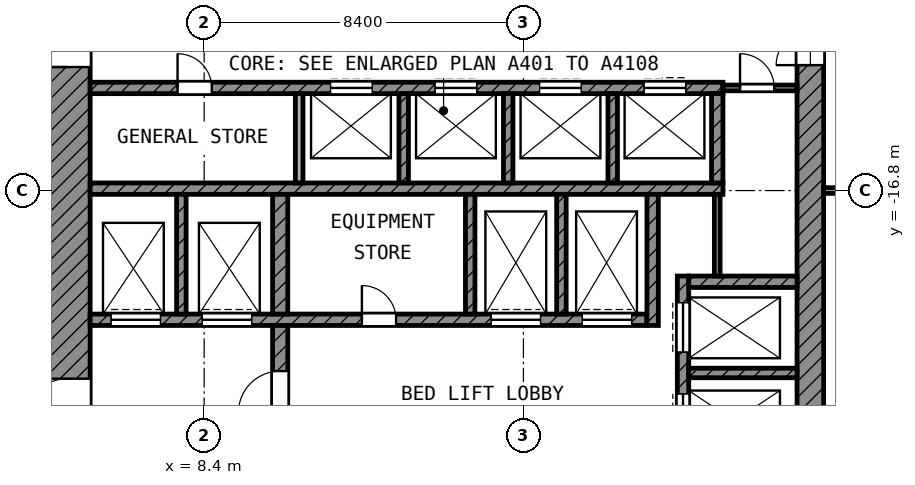
"""IFC4 building model, lengths in metres.
Left out: names, types, materials, properties, quantities, classifications, styles, units other than length and angle.
Written with IfcOpenShell. Run it as: python <this file> out.ifc"""

import sys

from ifc_helpers import new_model, si_unit, direction, frame, frame_2d, origin, place, context, subcontext, project, spatial, rectangle, extrude, element, fill, save


model = new_model("IFC4")
c1 = context("Model", 3, precision=1e-05, world=origin(), true_north=direction((0.0, 1.0)))
c2 = subcontext(c1, "Body", "Model", "MODEL_VIEW")
j1 = project(units=[si_unit("LENGTHUNIT", "METRE"), si_unit("PLANEANGLEUNIT", "RADIAN")], contexts=[c1])
p1 = place(None, origin())
s1 = spatial("IfcSite", under=j1, at=p1, CompositionType="ELEMENT")
p2 = place(p1, origin())
s2 = spatial("IfcBuilding", under=s1, at=p2, CompositionType="ELEMENT")
p3 = place(p2, frame((0.0, 0.0, 315.4)))
s3 = spatial("IfcBuildingStorey", under=s2, at=p3, CompositionType="ELEMENT", Elevation=315.4)
p4 = place(p3, frame((4.8, -24.7, 0.0), z_axis=(0.0, 0.0, 1.0), x_axis=(0.0, 1.0, 0.0)))
e1 = element("IfcWall", 1, at=p4, inside=s3, PredefinedType="SHEAR", context=c2, shape_type="SweptSolid", body=[
    extrude(rectangle(XDim=19.3, YDim=1.2, at=frame_2d((9.65, 0.0))), origin(), (0.0, 0.0, 1.0), 3.6),
])
p5 = place(p4, frame((11.15, 0.0, 0.0)))
e2 = element("IfcOpeningElement", 2, at=p5, cuts=e1, PredefinedType="OPENING", context=c2, shape_type="SweptSolid", body=[
    extrude(rectangle(XDim=1.1, YDim=2.1, at=frame_2d((0.55, 1.05))), frame((0.0, 0.61, 0.0), z_axis=(0.0, -1.0, 0.0), x_axis=(1.0, 0.0, 0.0)), (0.0, 0.0, 1.0), 1.22),
])
p6 = place(p4, frame((1.85, 0.0, 0.0)))
e3 = element("IfcOpeningElement", 3, at=p6, cuts=e1, PredefinedType="OPENING", context=c2, shape_type="SweptSolid", body=[
    extrude(rectangle(XDim=1.1, YDim=2.1, at=frame_2d((0.55, 1.05))), frame((0.0, 0.61, 0.0), z_axis=(0.0, -1.0, 0.0), x_axis=(1.0, 0.0, 0.0)), (0.0, 0.0, 1.0), 1.22),
])
p7 = place(p3, frame((24.35, -24.0, 0.0), z_axis=(0.0, 0.0, 1.0), x_axis=(0.0, 1.0, 0.0)))
e4 = element("IfcWall", 4, at=p7, inside=s3, PredefinedType="SHEAR", context=c2, shape_type="SweptSolid", body=[
    extrude(rectangle(XDim=18.6, YDim=0.7, at=frame_2d((9.3, 0.0))), origin(), (0.0, 0.0, 1.0), 3.6),
])
p8 = place(p7, frame((10.5, 0.0, 0.0)))
e5 = element("IfcOpeningElement", 5, at=p8, cuts=e4, PredefinedType="OPENING", context=c2, shape_type="SweptSolid", body=[
    extrude(rectangle(XDim=1.8, YDim=2.1, at=frame_2d((0.9, 1.05))), frame((0.0, 0.36, 0.0), z_axis=(0.0, -1.0, 0.0), x_axis=(1.0, 0.0, 0.0)), (0.0, 0.0, 1.0), 0.72),
])
p9 = place(p3, frame((5.4, -14.1, 0.0), z_axis=(0.0, 0.0, 1.0), x_axis=(1.0, 0.0, 0.0)))
e6 = element("IfcWall", 6, at=p9, inside=s3, PredefinedType="SHEAR", context=c2, shape_type="SweptSolid", body=[
    extrude(rectangle(XDim=16.65, YDim=0.3, at=frame_2d((8.325, 0.0))), origin(), (0.0, 0.0, 1.0), 3.6),
])
p10 = place(p9, frame((6.325, 0.0, 0.0)))
e7 = element("IfcOpeningElement", 7, at=p10, cuts=e6, PredefinedType="OPENING", context=c2, shape_type="SweptSolid", body=[
    extrude(rectangle(XDim=1.1, YDim=2.1, at=frame_2d((0.55, 1.05))), frame((0.0, 0.16, 0.0), z_axis=(0.0, -1.0, 0.0), x_axis=(1.0, 0.0, 0.0)), (0.0, 0.0, 1.0), 0.32),
])
p11 = place(p9, frame((9.075, 0.0, 0.0)))
e8 = element("IfcOpeningElement", 8, at=p11, cuts=e6, PredefinedType="OPENING", context=c2, shape_type="SweptSolid", body=[
    extrude(rectangle(XDim=1.1, YDim=2.1, at=frame_2d((0.55, 1.05))), frame((0.0, 0.16, 0.0), z_axis=(0.0, -1.0, 0.0), x_axis=(1.0, 0.0, 0.0)), (0.0, 0.0, 1.0), 0.32),
])
p12 = place(p9, frame((11.825, 0.0, 0.0)))
e9 = element("IfcOpeningElement", 9, at=p12, cuts=e6, PredefinedType="OPENING", context=c2, shape_type="SweptSolid", body=[
    extrude(rectangle(XDim=1.1, YDim=2.1, at=frame_2d((0.55, 1.05))), frame((0.0, 0.16, 0.0), z_axis=(0.0, -1.0, 0.0), x_axis=(1.0, 0.0, 0.0)), (0.0, 0.0, 1.0), 0.32),
])
p13 = place(p9, frame((14.575, 0.0, 0.0)))
e10 = element("IfcOpeningElement", 10, at=p13, cuts=e6, PredefinedType="OPENING", context=c2, shape_type="SweptSolid", body=[
    extrude(rectangle(XDim=1.1, YDim=2.1, at=frame_2d((0.55, 1.05))), frame((0.0, 0.16, 0.0), z_axis=(0.0, -1.0, 0.0), x_axis=(1.0, 0.0, 0.0)), (0.0, 0.0, 1.0), 0.32),
])
p14 = place(p9, frame((2.3, 0.0, 0.0)))
e11 = element("IfcOpeningElement", 11, at=p14, cuts=e6, PredefinedType="OPENING", context=c2, shape_type="SweptSolid", body=[
    extrude(rectangle(XDim=0.9, YDim=2.1, at=frame_2d((0.45, 1.05))), frame((0.0, 0.16, 0.0), z_axis=(0.0, -1.0, 0.0), x_axis=(1.0, 0.0, 0.0)), (0.0, 0.0, 1.0), 0.32),
])
p15 = place(p3, frame((5.4, -16.75, 0.0), z_axis=(0.0, 0.0, 1.0), x_axis=(1.0, 0.0, 0.0)))
e12 = element("IfcWall", 12, at=p15, inside=s3, PredefinedType="SHEAR", context=c2, shape_type="SweptSolid", body=[
    extrude(rectangle(XDim=16.65, YDim=0.3, at=frame_2d((8.325, 0.0))), origin(), (0.0, 0.0, 1.0), 3.6),
])
p16 = place(p3, frame((5.4, -20.2, 0.0), z_axis=(0.0, 0.0, 1.0), x_axis=(1.0, 0.0, 0.0)))
e13 = element("IfcWall", 13, at=p16, inside=s3, PredefinedType="SHEAR", context=c2, shape_type="SweptSolid", body=[
    extrude(rectangle(XDim=14.65, YDim=0.3, at=frame_2d((7.325, 0.0))), origin(), (0.0, 0.0, 1.0), 3.6),
])
p17 = place(p16, frame((10.55, 0.0, 0.0)))
e14 = element("IfcOpeningElement", 14, at=p17, cuts=e13, PredefinedType="OPENING", context=c2, shape_type="SweptSolid", body=[
    extrude(rectangle(XDim=1.3, YDim=2.1, at=frame_2d((0.65, 1.05))), frame((0.0, 0.16, 0.0), z_axis=(0.0, -1.0, 0.0), x_axis=(1.0, 0.0, 0.0)), (0.0, 0.0, 1.0), 0.32),
])
p18 = place(p16, frame((12.95, 0.0, 0.0)))
e15 = element("IfcOpeningElement", 15, at=p18, cuts=e13, PredefinedType="OPENING", context=c2, shape_type="SweptSolid", body=[
    extrude(rectangle(XDim=1.3, YDim=2.1, at=frame_2d((0.65, 1.05))), frame((0.0, 0.16, 0.0), z_axis=(0.0, -1.0, 0.0), x_axis=(1.0, 0.0, 0.0)), (0.0, 0.0, 1.0), 0.32),
])
p19 = place(p16, frame((0.55, 0.0, 0.0)))
e16 = element("IfcOpeningElement", 16, at=p19, cuts=e13, PredefinedType="OPENING", context=c2, shape_type="SweptSolid", body=[
    extrude(rectangle(XDim=1.3, YDim=2.1, at=frame_2d((0.65, 1.05))), frame((0.0, 0.16, 0.0), z_axis=(0.0, -1.0, 0.0), x_axis=(1.0, 0.0, 0.0)), (0.0, 0.0, 1.0), 0.32),
])
p20 = place(p16, frame((2.95, 0.0, 0.0)))
e17 = element("IfcOpeningElement", 17, at=p20, cuts=e13, PredefinedType="OPENING", context=c2, shape_type="SweptSolid", body=[
    extrude(rectangle(XDim=1.3, YDim=2.1, at=frame_2d((0.65, 1.05))), frame((0.0, 0.16, 0.0), z_axis=(0.0, -1.0, 0.0), x_axis=(1.0, 0.0, 0.0)), (0.0, 0.0, 1.0), 0.32),
])
p21 = place(p16, frame((7.15, 0.0, 0.0)))
e18 = element("IfcOpeningElement", 18, at=p21, cuts=e13, PredefinedType="OPENING", context=c2, shape_type="SweptSolid", body=[
    extrude(rectangle(XDim=0.9, YDim=2.1, at=frame_2d((0.45, 1.05))), frame((0.0, 0.16, 0.0), z_axis=(0.0, -1.0, 0.0), x_axis=(1.0, 0.0, 0.0)), (0.0, 0.0, 1.0), 0.32),
])
p22 = place(p3, frame((10.4, -24.0, 0.0), z_axis=(0.0, 0.0, 1.0), x_axis=(0.0, 1.0, 0.0)))
e19 = element("IfcWall", 19, at=p22, inside=s3, PredefinedType="SHEAR", context=c2, shape_type="SweptSolid", body=[
    extrude(rectangle(XDim=3.65, YDim=0.4, at=frame_2d((1.825, 0.0))), origin(), (0.0, 0.0, 1.0), 3.6),
])
p23 = place(p22, frame((1.35, 0.0, 0.0)))
e20 = element("IfcOpeningElement", 20, at=p23, cuts=e19, PredefinedType="OPENING", context=c2, shape_type="SweptSolid", body=[
    extrude(rectangle(XDim=1.1, YDim=2.1, at=frame_2d((0.55, 1.05))), frame((0.0, 0.21, 0.0), z_axis=(0.0, -1.0, 0.0), x_axis=(1.0, 0.0, 0.0)), (0.0, 0.0, 1.0), 0.42),
])
p24 = place(p3, frame((10.4, -20.05, 0.0), z_axis=(0.0, 0.0, 1.0), x_axis=(0.0, 1.0, 0.0)))
e21 = element("IfcWall", 21, at=p24, inside=s3, PredefinedType="SHEAR", context=c2, shape_type="SweptSolid", body=[
    extrude(rectangle(XDim=3.15, YDim=0.4, at=frame_2d((1.575, 0.0))), origin(), (0.0, 0.0, 1.0), 3.6),
])
p25 = place(p3, frame((20.2, -20.35, 0.0), z_axis=(0.0, 0.0, 1.0), x_axis=(0.0, 1.0, 0.0)))
e22 = element("IfcWall", 22, at=p25, inside=s3, PredefinedType="SHEAR", context=c2, shape_type="SweptSolid", body=[
    extrude(rectangle(XDim=3.45, YDim=0.3, at=frame_2d((1.725, 0.0))), origin(), (0.0, 0.0, 1.0), 3.6),
])
p26 = place(p3, frame((21.9, -16.6, 0.0), z_axis=(0.0, 0.0, 1.0), x_axis=(0.0, 1.0, 0.0)))
e23 = element("IfcWall", 23, at=p26, inside=s3, PredefinedType="SHEAR", context=c2, shape_type="SweptSolid", body=[
    extrude(rectangle(XDim=2.35, YDim=0.3, at=frame_2d((1.175, 0.0))), origin(), (0.0, 0.0, 1.0), 3.6),
])
p27 = place(p3, frame((21.15, -19.2, 0.0), z_axis=(0.0, 0.0, 1.0), x_axis=(1.0, 0.0, 0.0)))
e24 = element("IfcWall", 24, at=p27, inside=s3, PredefinedType="SHEAR", context=c2, shape_type="SweptSolid", body=[
    extrude(rectangle(XDim=2.85, YDim=0.3, at=frame_2d((1.425, 0.0))), origin(), (0.0, 0.0, 1.0), 3.6),
])
p28 = place(p3, frame((21.0, -24.0, 0.0), z_axis=(0.0, 0.0, 1.0), x_axis=(0.0, 1.0, 0.0)))
e25 = element("IfcWall", 25, at=p28, inside=s3, PredefinedType="SHEAR", context=c2, shape_type="SweptSolid", body=[
    extrude(rectangle(XDim=4.95, YDim=0.3, at=frame_2d((2.475, 0.0))), origin(), (0.0, 0.0, 1.0), 3.6),
])
p29 = place(p28, frame((2.95, 0.0, 0.0)))
e26 = element("IfcOpeningElement", 26, at=p29, cuts=e25, PredefinedType="OPENING", context=c2, shape_type="SweptSolid", body=[
    extrude(rectangle(XDim=1.3, YDim=2.1, at=frame_2d((0.65, 1.05))), frame((0.0, 0.16, 0.0), z_axis=(0.0, -1.0, 0.0), x_axis=(1.0, 0.0, 0.0)), (0.0, 0.0, 1.0), 0.32),
])
p30 = place(p28, frame((0.55, 0.0, 0.0)))
e27 = element("IfcOpeningElement", 27, at=p30, cuts=e25, PredefinedType="OPENING", context=c2, shape_type="SweptSolid", body=[
    extrude(rectangle(XDim=1.3, YDim=2.1, at=frame_2d((0.65, 1.05))), frame((0.0, 0.16, 0.0), z_axis=(0.0, -1.0, 0.0), x_axis=(1.0, 0.0, 0.0)), (0.0, 0.0, 1.0), 0.32),
])
p31 = place(p3, frame((21.15, -21.6, 0.0), z_axis=(0.0, 0.0, 1.0), x_axis=(1.0, 0.0, 0.0)))
e28 = element("IfcWall", 28, at=p31, inside=s3, PredefinedType="SHEAR", context=c2, shape_type="SweptSolid", body=[
    extrude(rectangle(XDim=2.85, YDim=0.25, at=frame_2d((1.425, 0.0))), origin(), (0.0, 0.0, 1.0), 3.6),
])
for number, where, z_axis, x_axis in (
    (29, (7.8, -20.05, 0.0), (0.0, 0.0, 1.0), (0.0, 1.0, 0.0)),
    (30, (15.4, -20.05, 0.0), (0.0, 0.0, 1.0), (0.0, 1.0, 0.0)),
    (31, (17.8, -20.05, 0.0), (0.0, 0.0, 1.0), (0.0, 1.0, 0.0)),
):
    element("IfcWall", number, at=place(p3, frame(where, z_axis=z_axis, x_axis=x_axis)), inside=s3, PredefinedType="SHEAR", context=c2, shape_type="SweptSolid", body=[
        extrude(rectangle(XDim=3.15, YDim=0.25, at=frame_2d((1.575, 0.0))), origin(), (0.0, 0.0, 1.0), 3.6),
    ])
p32 = place(p3, frame((10.9, -16.6, 0.0), z_axis=(0.0, 0.0, 1.0), x_axis=(0.0, 1.0, 0.0)))
e32 = element("IfcWall", 32, at=p32, inside=s3, PredefinedType="PARTITIONING", context=c2, shape_type="SweptSolid", body=[
    extrude(rectangle(XDim=2.35, YDim=0.2, at=frame_2d((1.175, 0.0))), origin(), (0.0, 0.0, 1.0), 3.6),
])
for number, where, z_axis, x_axis in (
    (33, (13.65, -16.6, 0.0), (0.0, 0.0, 1.0), (0.0, 1.0, 0.0)),
    (34, (16.4, -16.6, 0.0), (0.0, 0.0, 1.0), (0.0, 1.0, 0.0)),
    (35, (19.15, -16.6, 0.0), (0.0, 0.0, 1.0), (0.0, 1.0, 0.0)),
):
    element("IfcWall", number, at=place(p3, frame(where, z_axis=z_axis, x_axis=x_axis)), inside=s3, PredefinedType="SHEAR", context=c2, shape_type="SweptSolid", body=[
        extrude(rectangle(XDim=2.35, YDim=0.25, at=frame_2d((1.175, 0.0))), origin(), (0.0, 0.0, 1.0), 3.6),
    ])
p33 = place(p3, frame((21.9, -19.05, 0.0), z_axis=(0.0, 0.0, 1.0), x_axis=(0.0, 1.0, 0.0)))
e36 = element("IfcWall", 36, at=p33, inside=s3, PredefinedType="PARTITIONING", context=c2, shape_type="SweptSolid", body=[
    extrude(rectangle(XDim=2.15, YDim=0.15, at=frame_2d((1.075, 0.0))), origin(), (0.0, 0.0, 1.0), 3.6),
])
p34 = place(p3, frame((22.05, -14.1, 0.0), z_axis=(0.0, 0.0, 1.0), x_axis=(1.0, 0.0, 0.0)))
e37 = element("IfcWall", 37, at=p34, inside=s3, PredefinedType="PARTITIONING", context=c2, shape_type="SweptSolid", body=[
    extrude(rectangle(XDim=1.95, YDim=0.15, at=frame_2d((0.975, 0.0))), origin(), (0.0, 0.0, 1.0), 3.6),
])
p35 = place(p34, frame((0.45, 0.0, 0.0)))
e38 = element("IfcOpeningElement", 38, at=p35, cuts=e37, PredefinedType="OPENING", context=c2, shape_type="SweptSolid", body=[
    extrude(rectangle(XDim=0.9, YDim=2.1, at=frame_2d((0.45, 1.05))), frame((0.0, 0.085, 0.0), z_axis=(0.0, -1.0, 0.0), x_axis=(1.0, 0.0, 0.0)), (0.0, 0.0, 1.0), 0.17),
])
p36 = place(p3, frame((24.7, -16.8, 0.0), z_axis=(0.0, 0.0, 1.0), x_axis=(1.0, 0.0, 0.0)))
e39 = element("IfcWall", 39, at=p36, inside=s3, PredefinedType="PARTITIONING", context=c2, shape_type="SweptSolid", body=[
    extrude(rectangle(XDim=34.02, YDim=0.15, at=frame_2d((17.01, 0.0))), origin(), (0.0, 0.0, 1.0), 3.6),
])
p37 = place(p36, frame((1.85, 0.0, 0.0)))
e40 = element("IfcOpeningElement", 40, at=p37, cuts=e39, PredefinedType="OPENING", context=c2, shape_type="SweptSolid", body=[
    extrude(rectangle(XDim=1.5, YDim=2.1, at=frame_2d((0.75, 1.05))), frame((0.0, 0.085, 0.0), z_axis=(0.0, -1.0, 0.0), x_axis=(1.0, 0.0, 0.0)), (0.0, 0.0, 1.0), 0.17),
])
p38 = place(p36, frame((9.4, 0.0, 0.0)))
e41 = element("IfcOpeningElement", 41, at=p38, cuts=e39, PredefinedType="OPENING", context=c2, shape_type="SweptSolid", body=[
    extrude(rectangle(XDim=1.2, YDim=2.1, at=frame_2d((0.6, 1.05))), frame((0.0, 0.085, 0.0), z_axis=(0.0, -1.0, 0.0), x_axis=(1.0, 0.0, 0.0)), (0.0, 0.0, 1.0), 0.17),
])
p39 = place(p36, frame((19.8, 0.0, 0.0)))
e42 = element("IfcOpeningElement", 42, at=p39, cuts=e39, PredefinedType="OPENING", context=c2, shape_type="SweptSolid", body=[
    extrude(rectangle(XDim=1.2, YDim=2.1, at=frame_2d((0.6, 1.05))), frame((0.0, 0.085, 0.0), z_axis=(0.0, -1.0, 0.0), x_axis=(1.0, 0.0, 0.0)), (0.0, 0.0, 1.0), 0.17),
])
p40 = place(p36, frame((18.28, 0.0, 0.0)))
e43 = element("IfcOpeningElement", 43, at=p40, cuts=e39, PredefinedType="OPENING", context=c2, shape_type="SweptSolid", body=[
    extrude(rectangle(XDim=1.2, YDim=2.1, at=frame_2d((0.6, 1.05))), frame((0.0, 0.085, 0.0), z_axis=(0.0, -1.0, 0.0), x_axis=(1.0, 0.0, 0.0)), (0.0, 0.0, 1.0), 0.17),
])
p41 = place(p36, frame((24.0, 0.0, 0.0)))
e44 = element("IfcOpeningElement", 44, at=p41, cuts=e39, PredefinedType="OPENING", context=c2, shape_type="SweptSolid", body=[
    extrude(rectangle(XDim=1.2, YDim=2.1, at=frame_2d((0.6, 1.05))), frame((0.0, 0.085, 0.0), z_axis=(0.0, -1.0, 0.0), x_axis=(1.0, 0.0, 0.0)), (0.0, 0.0, 1.0), 0.17),
])
p42 = place(p36, frame((27.45, 0.0, 0.0)))
e45 = element("IfcOpeningElement", 45, at=p42, cuts=e39, PredefinedType="OPENING", context=c2, shape_type="SweptSolid", body=[
    extrude(rectangle(XDim=1.0, YDim=2.1, at=frame_2d((0.5, 1.05))), frame((0.0, 0.085, 0.0), z_axis=(0.0, -1.0, 0.0), x_axis=(1.0, 0.0, 0.0)), (0.0, 0.0, 1.0), 0.17),
])
p43 = place(p36, frame((31.65, 0.0, 0.0)))
e46 = element("IfcOpeningElement", 46, at=p43, cuts=e39, PredefinedType="OPENING", context=c2, shape_type="SweptSolid", body=[
    extrude(rectangle(XDim=1.0, YDim=2.1, at=frame_2d((0.5, 1.05))), frame((0.0, 0.085, 0.0), z_axis=(0.0, -1.0, 0.0), x_axis=(1.0, 0.0, 0.0)), (0.0, 0.0, 1.0), 0.17),
])
p44 = place(p10, origin())
e47 = element("IfcDoor", 47, at=p44, inside=s3, OperationType="DOUBLE_DOOR_SLIDING", PredefinedType="DOOR", context=c2, shape_type="SweptSolid", body=[
    extrude(rectangle(XDim=1.1, YDim=2.1, at=frame_2d((0.55, 1.05))), frame((0.0, 0.025, 0.0), z_axis=(0.0, -1.0, 0.0), x_axis=(1.0, 0.0, 0.0)), (0.0, 0.0, 1.0), 0.05),
])
fill(e7, e47)
p45 = place(p11, origin())
e48 = element("IfcDoor", 48, at=p45, inside=s3, OperationType="DOUBLE_DOOR_SLIDING", PredefinedType="DOOR", context=c2, shape_type="SweptSolid", body=[
    extrude(rectangle(XDim=1.1, YDim=2.1, at=frame_2d((0.55, 1.05))), frame((0.0, 0.025, 0.0), z_axis=(0.0, -1.0, 0.0), x_axis=(1.0, 0.0, 0.0)), (0.0, 0.0, 1.0), 0.05),
])
fill(e8, e48)
p46 = place(p12, origin())
e49 = element("IfcDoor", 49, at=p46, inside=s3, OperationType="DOUBLE_DOOR_SLIDING", PredefinedType="DOOR", context=c2, shape_type="SweptSolid", body=[
    extrude(rectangle(XDim=1.1, YDim=2.1, at=frame_2d((0.55, 1.05))), frame((0.0, 0.025, 0.0), z_axis=(0.0, -1.0, 0.0), x_axis=(1.0, 0.0, 0.0)), (0.0, 0.0, 1.0), 0.05),
])
fill(e9, e49)
p47 = place(p13, origin())
e50 = element("IfcDoor", 50, at=p47, inside=s3, OperationType="DOUBLE_DOOR_SLIDING", PredefinedType="DOOR", context=c2, shape_type="SweptSolid", body=[
    extrude(rectangle(XDim=1.1, YDim=2.1, at=frame_2d((0.55, 1.05))), frame((0.0, 0.025, 0.0), z_axis=(0.0, -1.0, 0.0), x_axis=(1.0, 0.0, 0.0)), (0.0, 0.0, 1.0), 0.05),
])
fill(e10, e50)
p48 = place(p29, origin())
e51 = element("IfcDoor", 51, at=p48, inside=s3, OperationType="DOUBLE_DOOR_SLIDING", PredefinedType="DOOR", context=c2, shape_type="SweptSolid", body=[
    extrude(rectangle(XDim=1.3, YDim=2.1, at=frame_2d((0.65, 1.05))), frame((0.0, 0.025, 0.0), z_axis=(0.0, -1.0, 0.0), x_axis=(1.0, 0.0, 0.0)), (0.0, 0.0, 1.0), 0.05),
])
fill(e26, e51)
p49 = place(p30, origin())
e52 = element("IfcDoor", 52, at=p49, inside=s3, OperationType="DOUBLE_DOOR_SLIDING", PredefinedType="DOOR", context=c2, shape_type="SweptSolid", body=[
    extrude(rectangle(XDim=1.3, YDim=2.1, at=frame_2d((0.65, 1.05))), frame((0.0, 0.025, 0.0), z_axis=(0.0, -1.0, 0.0), x_axis=(1.0, 0.0, 0.0)), (0.0, 0.0, 1.0), 0.05),
])
fill(e27, e52)
p50 = place(p17, origin())
e53 = element("IfcDoor", 53, at=p50, inside=s3, OperationType="DOUBLE_DOOR_SLIDING", PredefinedType="DOOR", context=c2, shape_type="SweptSolid", body=[
    extrude(rectangle(XDim=1.3, YDim=2.1, at=frame_2d((0.65, 1.05))), frame((0.0, 0.025, 0.0), z_axis=(0.0, -1.0, 0.0), x_axis=(1.0, 0.0, 0.0)), (0.0, 0.0, 1.0), 0.05),
])
fill(e14, e53)
p51 = place(p18, origin())
e54 = element("IfcDoor", 54, at=p51, inside=s3, OperationType="DOUBLE_DOOR_SLIDING", PredefinedType="DOOR", context=c2, shape_type="SweptSolid", body=[
    extrude(rectangle(XDim=1.3, YDim=2.1, at=frame_2d((0.65, 1.05))), frame((0.0, 0.025, 0.0), z_axis=(0.0, -1.0, 0.0), x_axis=(1.0, 0.0, 0.0)), (0.0, 0.0, 1.0), 0.05),
])
fill(e15, e54)
p52 = place(p19, origin())
e55 = element("IfcDoor", 55, at=p52, inside=s3, OperationType="DOUBLE_DOOR_SLIDING", PredefinedType="DOOR", context=c2, shape_type="SweptSolid", body=[
    extrude(rectangle(XDim=1.3, YDim=2.1, at=frame_2d((0.65, 1.05))), frame((0.0, 0.025, 0.0), z_axis=(0.0, -1.0, 0.0), x_axis=(1.0, 0.0, 0.0)), (0.0, 0.0, 1.0), 0.05),
])
fill(e16, e55)
p53 = place(p20, origin())
e56 = element("IfcDoor", 56, at=p53, inside=s3, OperationType="DOUBLE_DOOR_SLIDING", PredefinedType="DOOR", context=c2, shape_type="SweptSolid", body=[
    extrude(rectangle(XDim=1.3, YDim=2.1, at=frame_2d((0.65, 1.05))), frame((0.0, 0.025, 0.0), z_axis=(0.0, -1.0, 0.0), x_axis=(1.0, 0.0, 0.0)), (0.0, 0.0, 1.0), 0.05),
])
fill(e17, e56)
p54 = place(p5, origin())
e57 = element("IfcDoor", 57, at=p54, inside=s3, OperationType="SINGLE_SWING_LEFT", PredefinedType="DOOR", context=c2, shape_type="SweptSolid", body=[
    extrude(rectangle(XDim=1.1, YDim=2.1, at=frame_2d((0.55, 1.05))), frame((0.0, 0.025, 0.0), z_axis=(0.0, -1.0, 0.0), x_axis=(1.0, 0.0, 0.0)), (0.0, 0.0, 1.0), 0.05),
])
fill(e2, e57)
p55 = place(p6, origin())
e58 = element("IfcDoor", 58, at=p55, inside=s3, OperationType="SINGLE_SWING_LEFT", PredefinedType="DOOR", context=c2, shape_type="SweptSolid", body=[
    extrude(rectangle(XDim=1.1, YDim=2.1, at=frame_2d((0.55, 1.05))), frame((0.0, 0.025, 0.0), z_axis=(0.0, -1.0, 0.0), x_axis=(1.0, 0.0, 0.0)), (0.0, 0.0, 1.0), 0.05),
])
fill(e3, e58)
p56 = place(p23, origin())
e59 = element("IfcDoor", 59, at=p56, inside=s3, OperationType="SINGLE_SWING_LEFT", PredefinedType="DOOR", context=c2, shape_type="SweptSolid", body=[
    extrude(rectangle(XDim=1.1, YDim=2.1, at=frame_2d((0.55, 1.05))), frame((0.0, 0.025, 0.0), z_axis=(0.0, -1.0, 0.0), x_axis=(1.0, 0.0, 0.0)), (0.0, 0.0, 1.0), 0.05),
])
fill(e20, e59)
p57 = place(p8, origin())
e60 = element("IfcDoor", 60, at=p57, inside=s3, OperationType="DOUBLE_DOOR_SINGLE_SWING", PredefinedType="DOOR", context=c2, shape_type="SweptSolid", body=[
    extrude(rectangle(XDim=1.8, YDim=2.1, at=frame_2d((0.9, 1.05))), frame((0.0, 0.025, 0.0), z_axis=(0.0, -1.0, 0.0), x_axis=(1.0, 0.0, 0.0)), (0.0, 0.0, 1.0), 0.05),
])
fill(e5, e60)
p58 = place(p35, origin())
e61 = element("IfcDoor", 61, at=p58, inside=s3, OperationType="SINGLE_SWING_LEFT", PredefinedType="DOOR", context=c2, shape_type="SweptSolid", body=[
    extrude(rectangle(XDim=0.9, YDim=2.1, at=frame_2d((0.45, 1.05))), frame((0.0, 0.025, 0.0), z_axis=(0.0, -1.0, 0.0), x_axis=(1.0, 0.0, 0.0)), (0.0, 0.0, 1.0), 0.05),
])
fill(e38, e61)
p59 = place(p21, origin())
e62 = element("IfcDoor", 62, at=p59, inside=s3, OperationType="SINGLE_SWING_LEFT", PredefinedType="DOOR", context=c2, shape_type="SweptSolid", body=[
    extrude(rectangle(XDim=0.9, YDim=2.1, at=frame_2d((0.45, 1.05))), frame((0.0, 0.025, 0.0), z_axis=(0.0, -1.0, 0.0), x_axis=(1.0, 0.0, 0.0)), (0.0, 0.0, 1.0), 0.05),
])
fill(e18, e62)
p60 = place(p14, origin())
e63 = element("IfcDoor", 63, at=p60, inside=s3, OperationType="SINGLE_SWING_LEFT", PredefinedType="DOOR", context=c2, shape_type="SweptSolid", body=[
    extrude(rectangle(XDim=0.9, YDim=2.1, at=frame_2d((0.45, 1.05))), frame((0.0, 0.025, 0.0), z_axis=(0.0, -1.0, 0.0), x_axis=(1.0, 0.0, 0.0)), (0.0, 0.0, 1.0), 0.05),
])
fill(e11, e63)
save(model, sys.argv[1])
